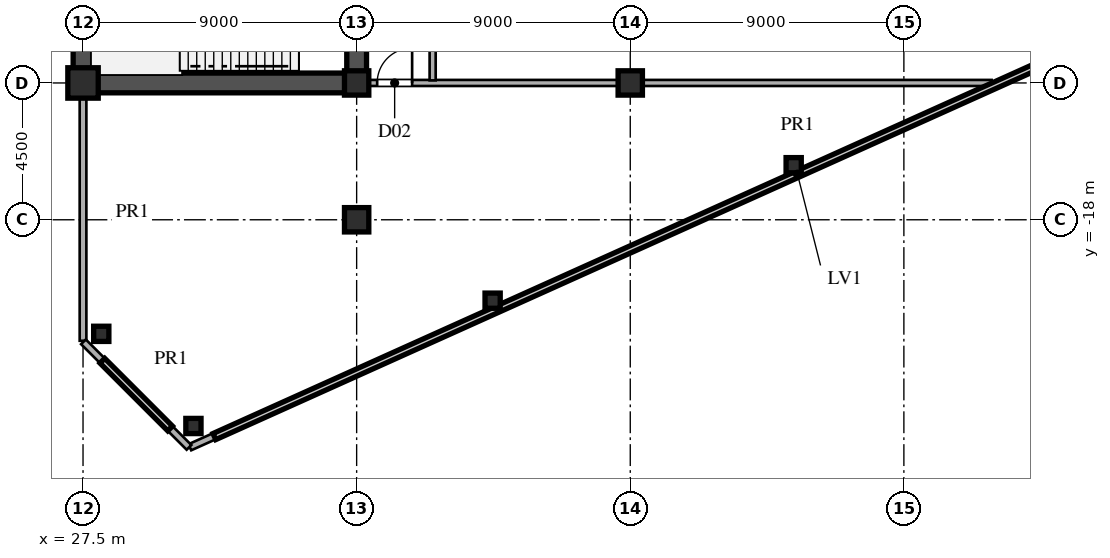
"""IFC4 building model, lengths in metres.
Left out: names, types, materials, properties, quantities, classifications, styles, units other than length and angle.
Written with IfcOpenShell. Run it as: python <this file> out.ifc"""

import sys

from ifc_helpers import new_model, si_unit, direction, frame, frame_2d, origin, origin_2d, place, context, subcontext, project, spatial, rectangle, hollow_rectangle, i_section, extrude, source, transform, mapped, element, fill, save


model = new_model("IFC4")
c1 = context("Model", 3, precision=1e-05, world=origin(), true_north=direction((0.0, 1.0)))
c2 = subcontext(c1, "Body", "Model", "MODEL_VIEW")
j1 = project(units=[si_unit("LENGTHUNIT", "METRE"), si_unit("PLANEANGLEUNIT", "RADIAN")], contexts=[c1])
p1 = place(None, origin())
s1 = spatial("IfcSite", under=j1, at=p1, CompositionType="ELEMENT")
p2 = place(p1, origin())
s2 = spatial("IfcBuilding", under=s1, at=p2, CompositionType="ELEMENT")
p3 = place(p2, frame((0.0, 0.0, 87.3)))
s3 = spatial("IfcBuildingStorey", under=s2, at=p3, CompositionType="ELEMENT", Elevation=87.3)
m1 = source(origin(), c2, "Body", "SweptSolid", [
    extrude(hollow_rectangle(XDim=1.0, YDim=1.0, WallThickness=0.042, at=origin_2d()), origin(), (0.0, 0.0, 1.0), 5.1),
])
p4 = place(p3, frame((27.5, -13.5, 0.0), z_axis=(0.0, 0.0, 1.0), x_axis=(1.0, 0.0, 0.0)))
e1 = element("IfcColumn", 1, at=p4, inside=s3, PredefinedType="COLUMN", context=c2, shape_type="MappedRepresentation", body=[
    mapped(m1, transform((0.0, 0.0, 0.0), scale=1.0)),
])
m2 = source(origin(), c2, "Body", "SweptSolid", [
    extrude(i_section(OverallWidth=0.8, OverallDepth=0.8, WebThickness=0.032, FlangeThickness=0.05, at=origin_2d()), origin(), (0.0, 0.0, 1.0), 5.1),
])
for number, where, z_axis, x_axis in (
    (2, (36.5, -18.0, 0.0), (0.0, 0.0, 1.0), (1.0, 0.0, 0.0)),
    (3, (36.5, -13.5, 0.0), (0.0, 0.0, 1.0), (1.0, 0.0, 0.0)),
    (4, (45.5, -13.5, 0.0), (0.0, 0.0, 1.0), (1.0, 0.0, 0.0)),
):
    element("IfcColumn", number, at=place(p3, frame(where, z_axis=z_axis, x_axis=x_axis)), inside=s3, PredefinedType="COLUMN", context=c2, shape_type="MappedRepresentation", body=[
        mapped(m2, transform((0.0, 0.0, 0.0), scale=1.0)),
    ])
m3 = source(origin(), c2, "Body", "SweptSolid", [
    extrude(hollow_rectangle(XDim=0.5, YDim=0.5, WallThickness=0.02, at=origin_2d()), origin(), (0.0, 0.0, 1.0), 5.1),
])
for number, where, z_axis, x_axis in (
    (5, (31.131, -24.783, 0.0), (0.0, 0.0, 1.0), (1.0, 0.0, 0.0)),
    (6, (28.1, -21.751, 0.0), (0.0, 0.0, 1.0), (1.0, 0.0, 0.0)),
    (7, (40.973, -20.661, 0.0), (0.0, 0.0, 1.0), (1.0, 0.0, 0.0)),
    (8, (50.875, -16.205, 0.0), (0.0, 0.0, 1.0), (1.0, 0.0, 0.0)),
):
    element("IfcColumn", number, at=place(p3, frame(where, z_axis=z_axis, x_axis=x_axis)), inside=s3, PredefinedType="COLUMN", context=c2, shape_type="MappedRepresentation", body=[
        mapped(m3, transform((0.0, 0.0, 0.0), scale=1.0)),
    ])
p5 = place(p3, frame((31.018, -25.492, 0.0), z_axis=(0.0, 0.0, 1.0), x_axis=(0.911922547569, 0.410362360889, 0.0)))
e9 = element("IfcWall", 9, at=p5, inside=s3, PredefinedType="PARAPET", context=c2, shape_type="SweptSolid", body=[
    extrude(rectangle(XDim=43.823, YDim=0.22, at=frame_2d((21.912, 0.0))), origin(), (0.0, 0.0, 1.0), 1.25),
])
p6 = place(p3, frame((27.5, -21.98, 0.0), z_axis=(0.0, 0.0, 1.0), x_axis=(0.0, 1.0, 0.0)))
e10 = element("IfcWall", 10, at=p6, inside=s3, PredefinedType="PARAPET", context=c2, shape_type="SweptSolid", body=[
    extrude(rectangle(XDim=8.46, YDim=0.22, at=frame_2d((4.23, 0.0))), origin(), (0.0, 0.0, 1.0), 1.25),
])
p7 = place(p3, frame((27.514, -22.014, 0.0), z_axis=(0.0, 0.0, 1.0), x_axis=(0.707106781187, -0.707106781187, 0.0)))
e11 = element("IfcWall", 11, at=p7, inside=s3, PredefinedType="PARAPET", context=c2, shape_type="SweptSolid", body=[
    extrude(rectangle(XDim=4.91, YDim=0.22, at=frame_2d((2.455, 0.0))), origin(), (0.0, 0.0, 1.0), 1.25),
])
p8 = place(p3, frame((27.5, -13.5, 0.0), z_axis=(0.0, 0.0, 1.0), x_axis=(0.0, 1.0, 0.0)))
e12 = element("IfcWall", 12, at=p8, inside=s3, PredefinedType="SHEAR", context=c2, shape_type="SweptSolid", body=[
    extrude(rectangle(XDim=12.2, YDim=0.65, at=frame_2d((6.1, 0.0))), origin(), (0.0, 0.0, 1.0), 4.88),
])
p9 = place(p3, frame((27.5, -13.5, 0.0), z_axis=(0.0, 0.0, 1.0), x_axis=(1.0, 0.0, 0.0)))
e13 = element("IfcWall", 13, at=p9, inside=s3, PredefinedType="SHEAR", context=c2, shape_type="SweptSolid", body=[
    extrude(rectangle(XDim=9.0, YDim=0.65, at=frame_2d((4.5, 0.0))), origin(), (0.0, 0.0, 1.0), 4.88),
])
p10 = place(p3, frame((36.5, -13.65, 0.0), z_axis=(0.0, 0.0, 1.0), x_axis=(0.0, 1.0, 0.0)))
e14 = element("IfcWall", 14, at=p10, inside=s3, PredefinedType="SHEAR", context=c2, shape_type="SweptSolid", body=[
    extrude(rectangle(XDim=7.15, YDim=0.65, at=frame_2d((3.575, 0.0))), origin(), (0.0, 0.0, 1.0), 4.88),
])
p11 = place(p10, frame((4.675, 0.0, 0.0)))
e15 = element("IfcOpeningElement", 15, at=p11, cuts=e14, PredefinedType="OPENING", context=c2, shape_type="SweptSolid", body=[
    extrude(rectangle(XDim=1.15, YDim=2.2, at=frame_2d((0.575, 1.1))), frame((0.0, 0.335, 0.0), z_axis=(0.0, -1.0, 0.0), x_axis=(1.0, 0.0, 0.0)), (0.0, 0.0, 1.0), 0.67),
])
p12 = place(p3, frame((36.83, -13.5, 0.0), z_axis=(0.0, 0.0, 1.0), x_axis=(1.0, 0.0, 0.0)))
e16 = element("IfcWall", 16, at=p12, inside=s3, PredefinedType="PARTITIONING", context=c2, shape_type="SweptSolid", body=[
    extrude(rectangle(XDim=8.69, YDim=0.2, at=frame_2d((4.345, 0.0))), origin(), (0.0, 0.0, 1.0), 4.18),
])
p13 = place(p12, frame((0.345, 0.0, 0.0)))
e17 = element("IfcOpeningElement", 17, at=p13, cuts=e16, PredefinedType="OPENING", context=c2, shape_type="SweptSolid", body=[
    extrude(rectangle(XDim=1.15, YDim=2.2, at=frame_2d((0.575, 1.1))), frame((0.0, 0.11, 0.0), z_axis=(0.0, -1.0, 0.0), x_axis=(1.0, 0.0, 0.0)), (0.0, 0.0, 1.0), 0.22),
])
p14 = place(p3, frame((45.52, -13.5, 0.0), z_axis=(0.0, 0.0, 1.0), x_axis=(1.0, 0.0, 0.0)))
e18 = element("IfcWall", 18, at=p14, inside=s3, PredefinedType="PARTITIONING", context=c2, shape_type="SweptSolid", body=[
    extrude(rectangle(XDim=11.866, YDim=0.2, at=frame_2d((5.933, 0.0))), origin(), (0.0, 0.0, 1.0), 4.88),
])
p15 = place(p3, frame((39.0, -13.415, 0.0), z_axis=(0.0, 0.0, 1.0), x_axis=(0.0, 1.0, 0.0)))
e19 = element("IfcWall", 19, at=p15, inside=s3, PredefinedType="PARTITIONING", context=c2, shape_type="SweptSolid", body=[
    extrude(rectangle(XDim=26.83, YDim=0.2, at=frame_2d((13.415, 0.0))), origin(), (0.0, 0.0, 1.0), 4.88),
])
p16 = place(p15, frame((4.04, 0.0, 0.0)))
e20 = element("IfcOpeningElement", 20, at=p16, cuts=e19, PredefinedType="OPENING", context=c2, shape_type="SweptSolid", body=[
    extrude(rectangle(XDim=1.15, YDim=2.2, at=frame_2d((0.575, 1.1))), frame((0.0, 0.11, 0.0), z_axis=(0.0, -1.0, 0.0), x_axis=(1.0, 0.0, 0.0)), (0.0, 0.0, 1.0), 0.22),
])
p17 = place(p15, frame((11.34, 0.0, 0.0)))
e21 = element("IfcOpeningElement", 21, at=p17, cuts=e19, PredefinedType="OPENING", context=c2, shape_type="SweptSolid", body=[
    extrude(rectangle(XDim=1.15, YDim=2.2, at=frame_2d((0.575, 1.1))), frame((0.0, 0.11, 0.0), z_axis=(0.0, -1.0, 0.0), x_axis=(1.0, 0.0, 0.0)), (0.0, 0.0, 1.0), 0.22),
])
p18 = place(p15, frame((17.59, 0.0, 0.0)))
e22 = element("IfcOpeningElement", 22, at=p18, cuts=e19, PredefinedType="OPENING", context=c2, shape_type="SweptSolid", body=[
    extrude(rectangle(XDim=1.15, YDim=2.2, at=frame_2d((0.575, 1.1))), frame((0.0, 0.11, 0.0), z_axis=(0.0, -1.0, 0.0), x_axis=(1.0, 0.0, 0.0)), (0.0, 0.0, 1.0), 0.22),
])
p19 = place(p15, frame((23.39, 0.0, 0.0)))
e23 = element("IfcOpeningElement", 23, at=p19, cuts=e19, PredefinedType="OPENING", context=c2, shape_type="SweptSolid", body=[
    extrude(rectangle(XDim=1.15, YDim=2.2, at=frame_2d((0.575, 1.1))), frame((0.0, 0.11, 0.0), z_axis=(0.0, -1.0, 0.0), x_axis=(1.0, 0.0, 0.0)), (0.0, 0.0, 1.0), 0.22),
])
m4 = source(origin(), c2, "Body", "SweptSolid", [
    extrude(rectangle(XDim=1.15, YDim=2.2, at=frame_2d((0.575, 1.1))), frame((0.0, 0.025, 0.0), z_axis=(0.0, -1.0, 0.0), x_axis=(1.0, 0.0, 0.0)), (0.0, 0.0, 1.0), 0.05),
])
p20 = place(p13, origin())
e24 = element("IfcDoor", 24, at=p20, inside=s3, OperationType="SINGLE_SWING_RIGHT", PredefinedType="DOOR", context=c2, shape_type="MappedRepresentation", body=[
    mapped(m4, transform((0.0, 0.0, 0.0), scale=1.0)),
])
fill(e17, e24)
save(model, sys.argv[1])
